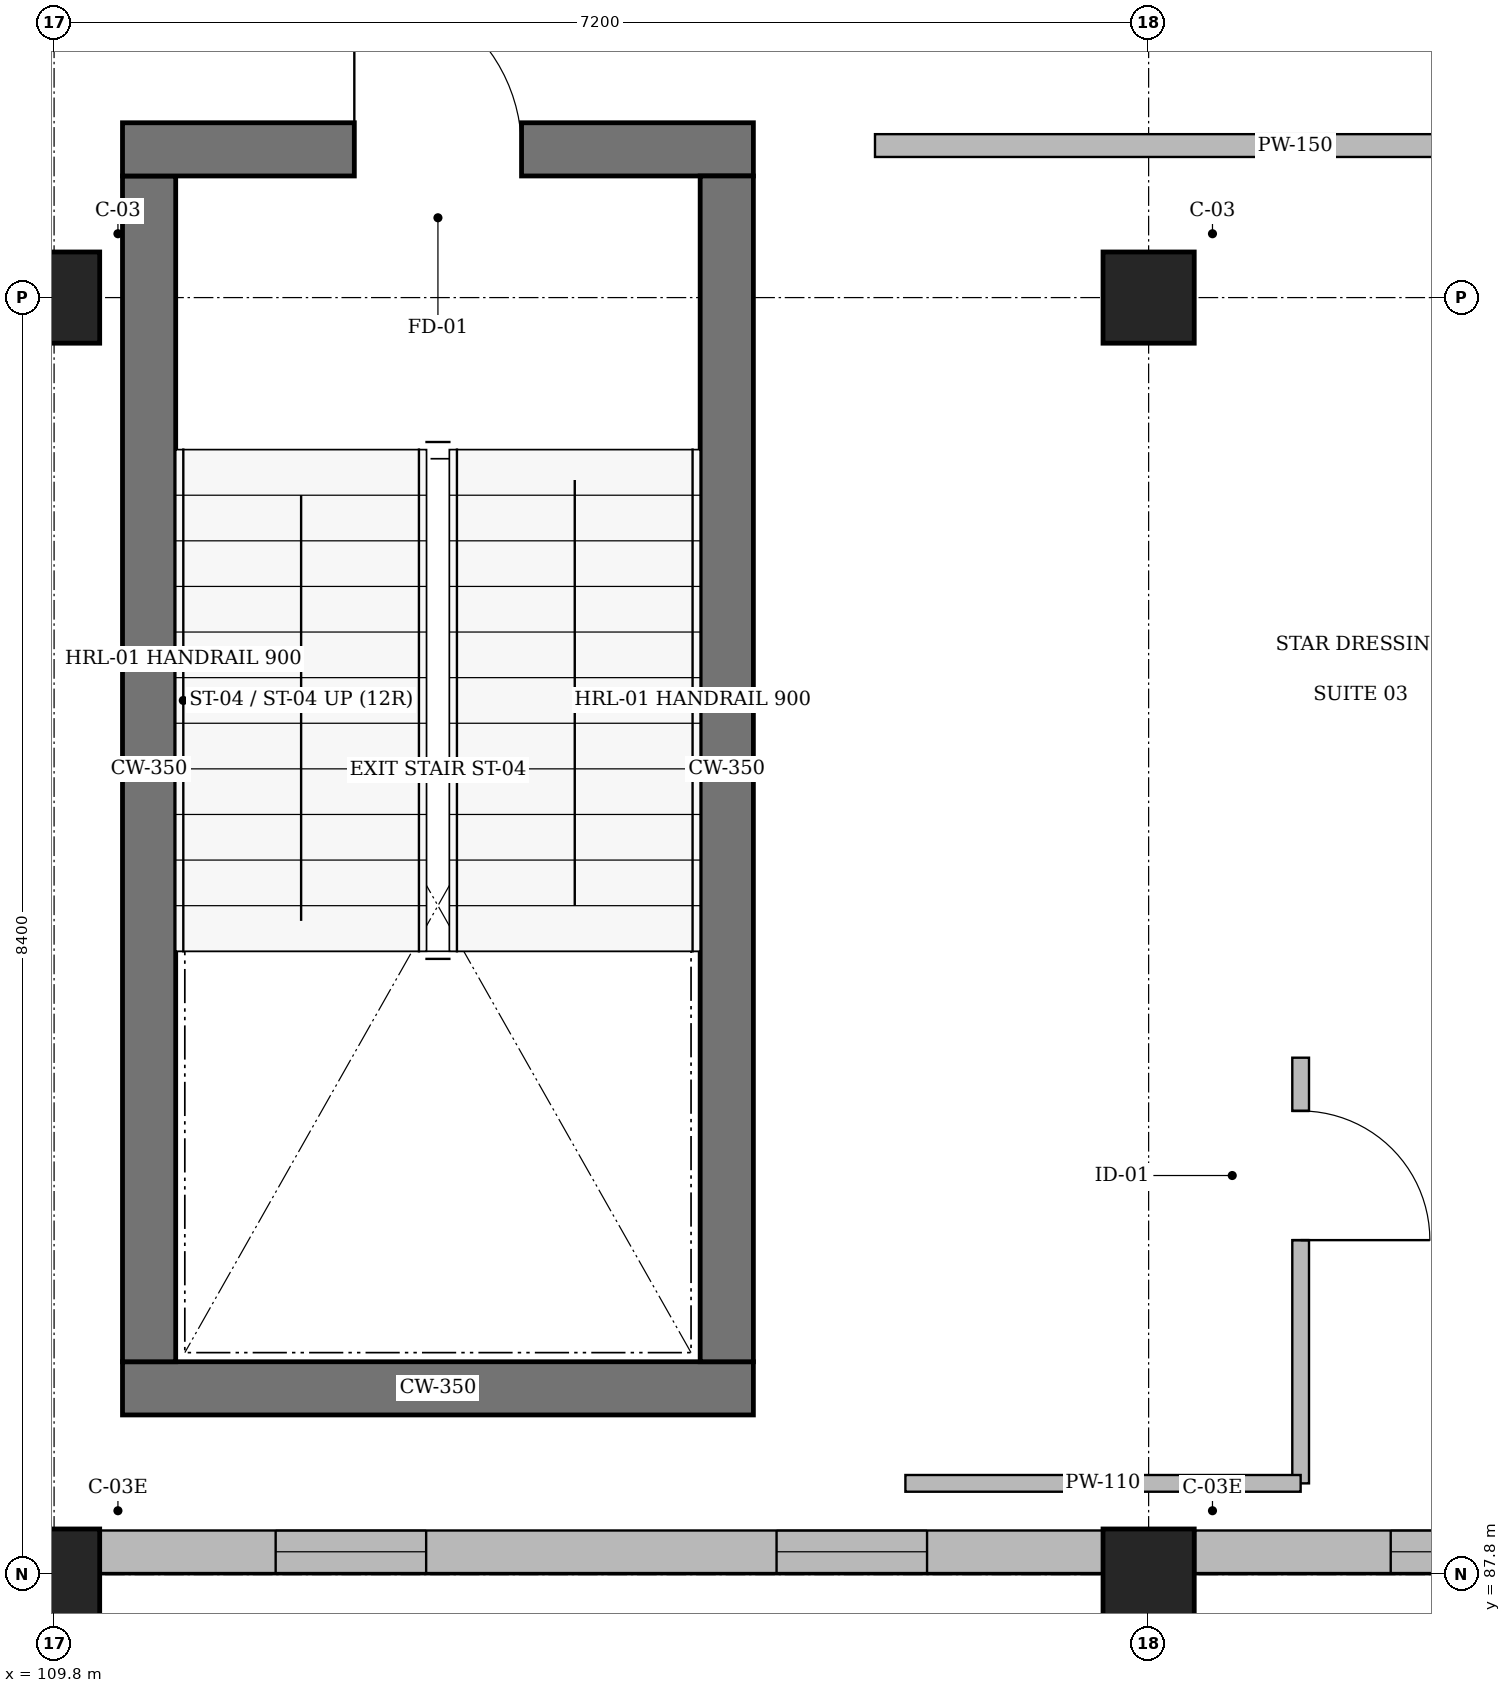
"""IFC4 building model, lengths in metres.
Left out: names, types, materials, properties, quantities, classifications, styles, units other than length and angle.
Written with IfcOpenShell. Run it as: python <this file> out.ifc"""

import sys

from ifc_helpers import new_model, si_unit, direction, frame, frame_2d, origin, origin_2d, place, context, subcontext, project, spatial, rectangle, extrude, element, fill, save


model = new_model("IFC4")
c1 = context("Model", 3, precision=1e-05, world=origin(), true_north=direction((0.0, 1.0)))
c2 = subcontext(c1, "Body", "Model", "MODEL_VIEW")
j1 = project(units=[si_unit("LENGTHUNIT", "METRE"), si_unit("PLANEANGLEUNIT", "RADIAN")], contexts=[c1])
p1 = place(None, origin())
s1 = spatial("IfcSite", under=j1, at=p1, CompositionType="ELEMENT")
p2 = place(p1, origin())
s2 = spatial("IfcBuilding", under=s1, at=p2, CompositionType="ELEMENT")
p3 = place(p2, frame((0.0, 0.0, 4.8)))
s3 = spatial("IfcBuildingStorey", under=s2, at=p3, CompositionType="ELEMENT", Elevation=4.8)
for number, where, z_axis, x_axis in (
    (1, (109.8, 87.8, 0.0), (0.0, 0.0, 1.0), (1.0, 0.0, 0.0)),
    (2, (109.8, 96.2, 0.0), (0.0, 0.0, 1.0), (1.0, 0.0, 0.0)),
    (3, (117.0, 87.8, 0.0), (0.0, 0.0, 1.0), (1.0, 0.0, 0.0)),
    (4, (117.0, 96.2, 0.0), (0.0, 0.0, 1.0), (1.0, 0.0, 0.0)),
):
    element("IfcColumn", number, at=place(p3, frame(where, z_axis=z_axis, x_axis=x_axis)), inside=s3, PredefinedType="COLUMN", context=c2, shape_type="SweptSolid", body=[
        extrude(rectangle(XDim=0.6, YDim=0.6, at=origin_2d()), origin(), (0.0, 0.0, 1.0), 4.2),
    ])
p4 = place(p3, frame((114.4, 89.025, 0.0), z_axis=(0.0, 0.0, 1.0), x_axis=(-1.0, 0.0, 0.0)))
e5 = element("IfcWall", 5, at=p4, inside=s3, PredefinedType="SOLIDWALL", context=c2, shape_type="SweptSolid", body=[
    extrude(rectangle(XDim=4.15, YDim=0.35, at=frame_2d((2.075, 0.0))), origin(), (0.0, 0.0, 1.0), 4.2),
])
p5 = place(p3, frame((110.425, 89.2, 0.0), z_axis=(0.0, 0.0, 1.0), x_axis=(0.0, 1.0, 0.0)))
e6 = element("IfcWall", 6, at=p5, inside=s3, PredefinedType="SOLIDWALL", context=c2, shape_type="SweptSolid", body=[
    extrude(rectangle(XDim=7.8, YDim=0.35, at=frame_2d((3.9, 0.0))), origin(), (0.0, 0.0, 1.0), 4.2),
])
p6 = place(p3, frame((110.25, 97.175, 0.0), z_axis=(0.0, 0.0, 1.0), x_axis=(1.0, 0.0, 0.0)))
e7 = element("IfcWall", 7, at=p6, inside=s3, PredefinedType="SOLIDWALL", context=c2, shape_type="SweptSolid", body=[
    extrude(rectangle(XDim=4.15, YDim=0.35, at=frame_2d((2.075, 0.0))), origin(), (0.0, 0.0, 1.0), 4.2),
])
p7 = place(p6, frame((1.525, 0.0, 0.0)))
e8 = element("IfcOpeningElement", 8, at=p7, cuts=e7, PredefinedType="OPENING", context=c2, shape_type="SweptSolid", body=[
    extrude(rectangle(XDim=1.1, YDim=2.15, at=frame_2d((0.55, 1.075))), frame((0.0, 0.195, 0.0), z_axis=(0.0, -1.0, 0.0), x_axis=(1.0, 0.0, 0.0)), (0.0, 0.0, 1.0), 0.39),
])
p8 = place(p3, frame((114.225, 97.0, 0.0), z_axis=(0.0, 0.0, 1.0), x_axis=(0.0, -1.0, 0.0)))
e9 = element("IfcWall", 9, at=p8, inside=s3, PredefinedType="SOLIDWALL", context=c2, shape_type="SweptSolid", body=[
    extrude(rectangle(XDim=7.8, YDim=0.35, at=frame_2d((3.9, 0.0))), origin(), (0.0, 0.0, 1.0), 4.2),
])
p9 = place(p3, frame((110.105, 87.95, 0.0), z_axis=(0.0, 0.0, 1.0), x_axis=(1.0, 0.0, 0.0)))
e10 = element("IfcWall", 10, at=p9, inside=s3, PredefinedType="SOLIDWALL", context=c2, shape_type="SweptSolid", body=[
    extrude(rectangle(XDim=6.59, YDim=0.28, at=frame_2d((3.295, 0.0))), origin(), (0.0, 0.0, 1.0), 3.273),
])
p10 = place(p9, frame((1.153, 0.0, 0.95)))
e11 = element("IfcOpeningElement", 11, at=p10, cuts=e10, PredefinedType="OPENING", context=c2, shape_type="SweptSolid", body=[
    extrude(rectangle(XDim=0.99, YDim=1.8, at=frame_2d((0.495, 0.9))), frame((0.0, 0.16, 0.0), z_axis=(0.0, -1.0, 0.0), x_axis=(1.0, 0.0, 0.0)), (0.0, 0.0, 1.0), 0.32),
])
p11 = place(p9, frame((4.448, 0.0, 0.95)))
e12 = element("IfcOpeningElement", 12, at=p11, cuts=e10, PredefinedType="OPENING", context=c2, shape_type="SweptSolid", body=[
    extrude(rectangle(XDim=0.99, YDim=1.8, at=frame_2d((0.495, 0.9))), frame((0.0, 0.16, 0.0), z_axis=(0.0, -1.0, 0.0), x_axis=(1.0, 0.0, 0.0)), (0.0, 0.0, 1.0), 0.32),
])
p12 = place(p3, frame((117.305, 87.95, 0.0), z_axis=(0.0, 0.0, 1.0), x_axis=(1.0, 0.0, 0.0)))
e13 = element("IfcWall", 13, at=p12, inside=s3, PredefinedType="SOLIDWALL", context=c2, shape_type="SweptSolid", body=[
    extrude(rectangle(XDim=7.79, YDim=0.28, at=frame_2d((3.895, 0.0))), origin(), (0.0, 0.0, 1.0), 3.273),
])
p13 = place(p12, frame((1.288, 0.0, 0.95)))
e14 = element("IfcOpeningElement", 14, at=p13, cuts=e13, PredefinedType="OPENING", context=c2, shape_type="SweptSolid", body=[
    extrude(rectangle(XDim=1.32, YDim=1.65, at=frame_2d((0.66, 0.825))), frame((0.0, 0.16, 0.0), z_axis=(0.0, -1.0, 0.0), x_axis=(1.0, 0.0, 0.0)), (0.0, 0.0, 1.0), 0.32),
])
p14 = place(p12, frame((5.183, 0.0, 0.95)))
e15 = element("IfcOpeningElement", 15, at=p14, cuts=e13, PredefinedType="OPENING", context=c2, shape_type="SweptSolid", body=[
    extrude(rectangle(XDim=1.32, YDim=1.65, at=frame_2d((0.66, 0.825))), frame((0.0, 0.16, 0.0), z_axis=(0.0, -1.0, 0.0), x_axis=(1.0, 0.0, 0.0)), (0.0, 0.0, 1.0), 0.32),
])
p15 = place(p3, frame((118.0, 91.2, 0.0), z_axis=(0.0, 0.0, 1.0), x_axis=(0.0, -1.0, 0.0)))
e16 = element("IfcWall", 16, at=p15, inside=s3, PredefinedType="PARTITIONING", context=c2, shape_type="SweptSolid", body=[
    extrude(rectangle(XDim=2.8, YDim=0.11, at=frame_2d((1.4, 0.0))), origin(), (0.0, 0.0, 1.0), 3.94),
])
p16 = place(p15, frame((0.35, 0.0, 0.0)))
e17 = element("IfcOpeningElement", 17, at=p16, cuts=e16, PredefinedType="OPENING", context=c2, shape_type="SweptSolid", body=[
    extrude(rectangle(XDim=0.85, YDim=2.1, at=frame_2d((0.425, 1.05))), frame((0.0, 0.075, 0.0), z_axis=(0.0, -1.0, 0.0), x_axis=(1.0, 0.0, 0.0)), (0.0, 0.0, 1.0), 0.15),
])
p17 = place(p3, frame((118.0, 88.4, 0.0), z_axis=(0.0, 0.0, 1.0), x_axis=(-1.0, 0.0, 0.0)))
e18 = element("IfcWall", 18, at=p17, inside=s3, PredefinedType="PARTITIONING", context=c2, shape_type="SweptSolid", body=[
    extrude(rectangle(XDim=2.6, YDim=0.11, at=frame_2d((1.3, 0.0))), origin(), (0.0, 0.0, 1.0), 3.94),
])
p18 = place(p3, frame((115.2, 97.2, 0.0), z_axis=(0.0, 0.0, 1.0), x_axis=(1.0, 0.0, 0.0)))
e19 = element("IfcWall", 19, at=p18, inside=s3, PredefinedType="PARTITIONING", context=c2, shape_type="SweptSolid", body=[
    extrude(rectangle(XDim=8.8, YDim=0.15, at=frame_2d((4.4, 0.0))), origin(), (0.0, 0.0, 1.0), 3.94),
])
p19 = place(p18, frame((5.528, 0.0, 0.0)))
e20 = element("IfcOpeningElement", 20, at=p19, cuts=e19, PredefinedType="OPENING", context=c2, shape_type="SweptSolid", body=[
    extrude(rectangle(XDim=0.95, YDim=2.2, at=frame_2d((0.475, 1.1))), frame((0.0, 0.095, 0.0), z_axis=(0.0, -1.0, 0.0), x_axis=(1.0, 0.0, 0.0)), (0.0, 0.0, 1.0), 0.19),
])
p20 = place(p7, origin())
e21 = element("IfcDoor", 21, at=p20, inside=s3, OperationType="SINGLE_SWING_LEFT", PredefinedType="DOOR", context=c2, shape_type="SweptSolid", body=[
    extrude(rectangle(XDim=1.1, YDim=2.15, at=frame_2d((0.55, 1.075))), frame((0.0, 0.025, 0.0), z_axis=(0.0, -1.0, 0.0), x_axis=(1.0, 0.0, 0.0)), (0.0, 0.0, 1.0), 0.05),
])
fill(e8, e21)
p21 = place(p10, origin())
e22 = element("IfcWindow", 22, at=p21, inside=s3, PartitioningType="SINGLE_PANEL", PredefinedType="WINDOW", context=c2, shape_type="SweptSolid", body=[
    extrude(rectangle(XDim=0.99, YDim=1.8, at=frame_2d((0.495, 0.9))), frame((0.0, 0.03, 0.0), z_axis=(0.0, -1.0, 0.0), x_axis=(1.0, 0.0, 0.0)), (0.0, 0.0, 1.0), 0.06),
])
fill(e11, e22)
p22 = place(p11, origin())
e23 = element("IfcWindow", 23, at=p22, inside=s3, PartitioningType="SINGLE_PANEL", PredefinedType="WINDOW", context=c2, shape_type="SweptSolid", body=[
    extrude(rectangle(XDim=0.99, YDim=1.8, at=frame_2d((0.495, 0.9))), frame((0.0, 0.03, 0.0), z_axis=(0.0, -1.0, 0.0), x_axis=(1.0, 0.0, 0.0)), (0.0, 0.0, 1.0), 0.06),
])
fill(e12, e23)
p23 = place(p13, origin())
e24 = element("IfcWindow", 24, at=p23, inside=s3, PartitioningType="SINGLE_PANEL", PredefinedType="WINDOW", context=c2, shape_type="SweptSolid", body=[
    extrude(rectangle(XDim=1.32, YDim=1.65, at=frame_2d((0.66, 0.825))), frame((0.0, 0.03, 0.0), z_axis=(0.0, -1.0, 0.0), x_axis=(1.0, 0.0, 0.0)), (0.0, 0.0, 1.0), 0.06),
])
fill(e14, e24)
p24 = place(p16, origin())
e25 = element("IfcDoor", 25, at=p24, inside=s3, OperationType="SINGLE_SWING_RIGHT", PredefinedType="DOOR", context=c2, shape_type="SweptSolid", body=[
    extrude(rectangle(XDim=0.85, YDim=2.1, at=frame_2d((0.425, 1.05))), frame((0.0, 0.025, 0.0), z_axis=(0.0, -1.0, 0.0), x_axis=(1.0, 0.0, 0.0)), (0.0, 0.0, 1.0), 0.05),
])
fill(e17, e25)
save(model, sys.argv[1])
